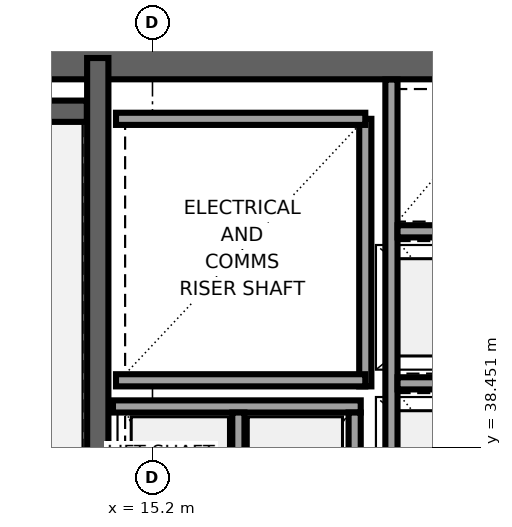
"""IFC4 building model, lengths in metres.
Left out: names, types, materials, properties, quantities, classifications, styles, units other than length and angle.
Written with IfcOpenShell. Run it as: python <this file> out.ifc"""

import sys

from ifc_helpers import new_model, si_unit, direction, frame, frame_2d, origin, place, context, subcontext, project, spatial, rectangle, extrude, element, save


model = new_model("IFC4")
c1 = context("Model", 3, precision=1e-05, world=origin(), true_north=direction((0.0, 1.0)))
c2 = subcontext(c1, "Body", "Model", "MODEL_VIEW")
j1 = project(units=[si_unit("LENGTHUNIT", "METRE"), si_unit("PLANEANGLEUNIT", "RADIAN")], contexts=[c1])
p1 = place(None, origin())
s1 = spatial("IfcSite", under=j1, at=p1, CompositionType="ELEMENT")
p2 = place(p1, origin())
s2 = spatial("IfcBuilding", under=s1, at=p2, CompositionType="ELEMENT")
p3 = place(p2, frame((0.0, 0.0, 147.05)))
s3 = spatial("IfcBuildingStorey", under=s2, at=p3, CompositionType="ELEMENT", Elevation=147.05)
p4 = place(p3, frame((9.8, 44.85, 0.0), z_axis=(0.0, 0.0, 1.0), x_axis=(1.0, 0.0, 0.0)))
e1 = element("IfcWall", 1, at=p4, inside=s3, PredefinedType="SHEAR", context=c2, shape_type="SweptSolid", body=[
    extrude(rectangle(XDim=26.4, YDim=0.7, at=frame_2d((13.2, 0.0))), origin(), (0.0, 0.0, 1.0), 3.55),
])
p5 = place(p3, frame((14.3, 31.95, 0.0), z_axis=(0.0, 0.0, 1.0), x_axis=(0.0, 1.0, 0.0)))
e2 = element("IfcWall", 2, at=p5, inside=s3, PredefinedType="SHEAR", context=c2, shape_type="SweptSolid", body=[
    extrude(rectangle(XDim=12.9, YDim=0.35, at=frame_2d((6.45, 0.0))), origin(), (0.0, 0.0, 1.0), 3.55),
])
p6 = place(p5, frame((0.6, 0.0, 0.0)))
e3 = element("IfcOpeningElement", 3, at=p6, cuts=e2, PredefinedType="OPENING", context=c2, shape_type="SweptSolid", body=[
    extrude(rectangle(XDim=1.1, YDim=2.12, at=frame_2d((0.55, 1.06))), frame((0.0, 0.185, 0.0), z_axis=(0.0, -1.0, 0.0), x_axis=(1.0, 0.0, 0.0)), (0.0, 0.0, 1.0), 0.37),
])
p7 = place(p3, frame((10.52, 43.975, 0.0), z_axis=(0.0, 0.0, 1.0), x_axis=(1.0, 0.0, 0.0)))
e4 = element("IfcWall", 4, at=p7, inside=s3, PredefinedType="SHEAR", context=c2, shape_type="SweptSolid", body=[
    extrude(rectangle(XDim=3.6, YDim=0.35, at=frame_2d((1.8, 0.0))), origin(), (0.0, 0.0, 1.0), 3.55),
])
p8 = place(p3, frame((18.7, 39.45, 0.0), z_axis=(0.0, 0.0, 1.0), x_axis=(0.0, 1.0, 0.0)))
e5 = element("IfcWall", 5, at=p8, inside=s3, PredefinedType="SOLIDWALL", context=c2, shape_type="SweptSolid", body=[
    extrude(rectangle(XDim=4.4, YDim=0.2, at=frame_2d((2.2, 0.0))), origin(), (0.0, 0.0, 1.0), 3.37),
])
for number, where, z_axis, x_axis in (
    (6, (14.6, 39.55, 0.0), (0.0, 0.0, 1.0), (1.0, 0.0, 0.0)),
    (7, (14.6, 43.85, 0.0), (0.0, 0.0, 1.0), (1.0, 0.0, 0.0)),
):
    element("IfcWall", number, at=place(p3, frame(where, z_axis=z_axis, x_axis=x_axis)), inside=s3, PredefinedType="SOLIDWALL", context=c2, shape_type="SweptSolid", body=[
        extrude(rectangle(XDim=4.1, YDim=0.2, at=frame_2d((2.05, 0.0))), origin(), (0.0, 0.0, 1.0), 3.37),
    ])
p9 = place(p3, frame((19.13, 36.16, 0.0), z_axis=(0.0, 0.0, 1.0), x_axis=(0.0, 1.0, 0.0)))
e8 = element("IfcWall", 8, at=p9, inside=s3, PredefinedType="SOLIDWALL", context=c2, shape_type="SweptSolid", body=[
    extrude(rectangle(XDim=8.336, YDim=0.2, at=frame_2d((4.168, 0.0))), origin(), (0.0, 0.0, 1.0), 3.37),
])
for number, where, z_axis, x_axis in (
    (9, (19.23, 39.5, 0.0), (0.0, 0.0, 1.0), (1.0, 0.0, 0.0)),
    (10, (19.23, 42.0, 0.0), (0.0, 0.0, 1.0), (1.0, 0.0, 0.0)),
):
    element("IfcWall", number, at=place(p3, frame(where, z_axis=z_axis, x_axis=x_axis)), inside=s3, PredefinedType="SOLIDWALL", context=c2, shape_type="SweptSolid", body=[
        extrude(rectangle(XDim=1.84, YDim=0.2, at=frame_2d((0.92, 0.0))), origin(), (0.0, 0.0, 1.0), 3.37),
    ])
p10 = place(p3, frame((14.55, 39.12, 0.0), z_axis=(0.0, 0.0, 1.0), x_axis=(1.0, 0.0, 0.0)))
e11 = element("IfcWall", 11, at=p10, inside=s3, PredefinedType="SOLIDWALL", context=c2, shape_type="SweptSolid", body=[
    extrude(rectangle(XDim=4.075, YDim=0.2, at=frame_2d((2.038, 0.0))), origin(), (0.0, 0.0, 1.0), 3.37),
])
for number, where, z_axis, x_axis in (
    (12, (18.525, 36.48, 0.0), (0.0, 0.0, 1.0), (0.0, 1.0, 0.0)),
    (13, (16.613, 36.48, 0.0), (0.0, 0.0, 1.0), (0.0, 1.0, 0.0)),
):
    element("IfcWall", number, at=place(p3, frame(where, z_axis=z_axis, x_axis=x_axis)), inside=s3, PredefinedType="SOLIDWALL", context=c2, shape_type="SweptSolid", body=[
        extrude(rectangle(XDim=2.54, YDim=0.2, at=frame_2d((1.27, 0.0))), origin(), (0.0, 0.0, 1.0), 3.37),
    ])
save(model, sys.argv[1])
